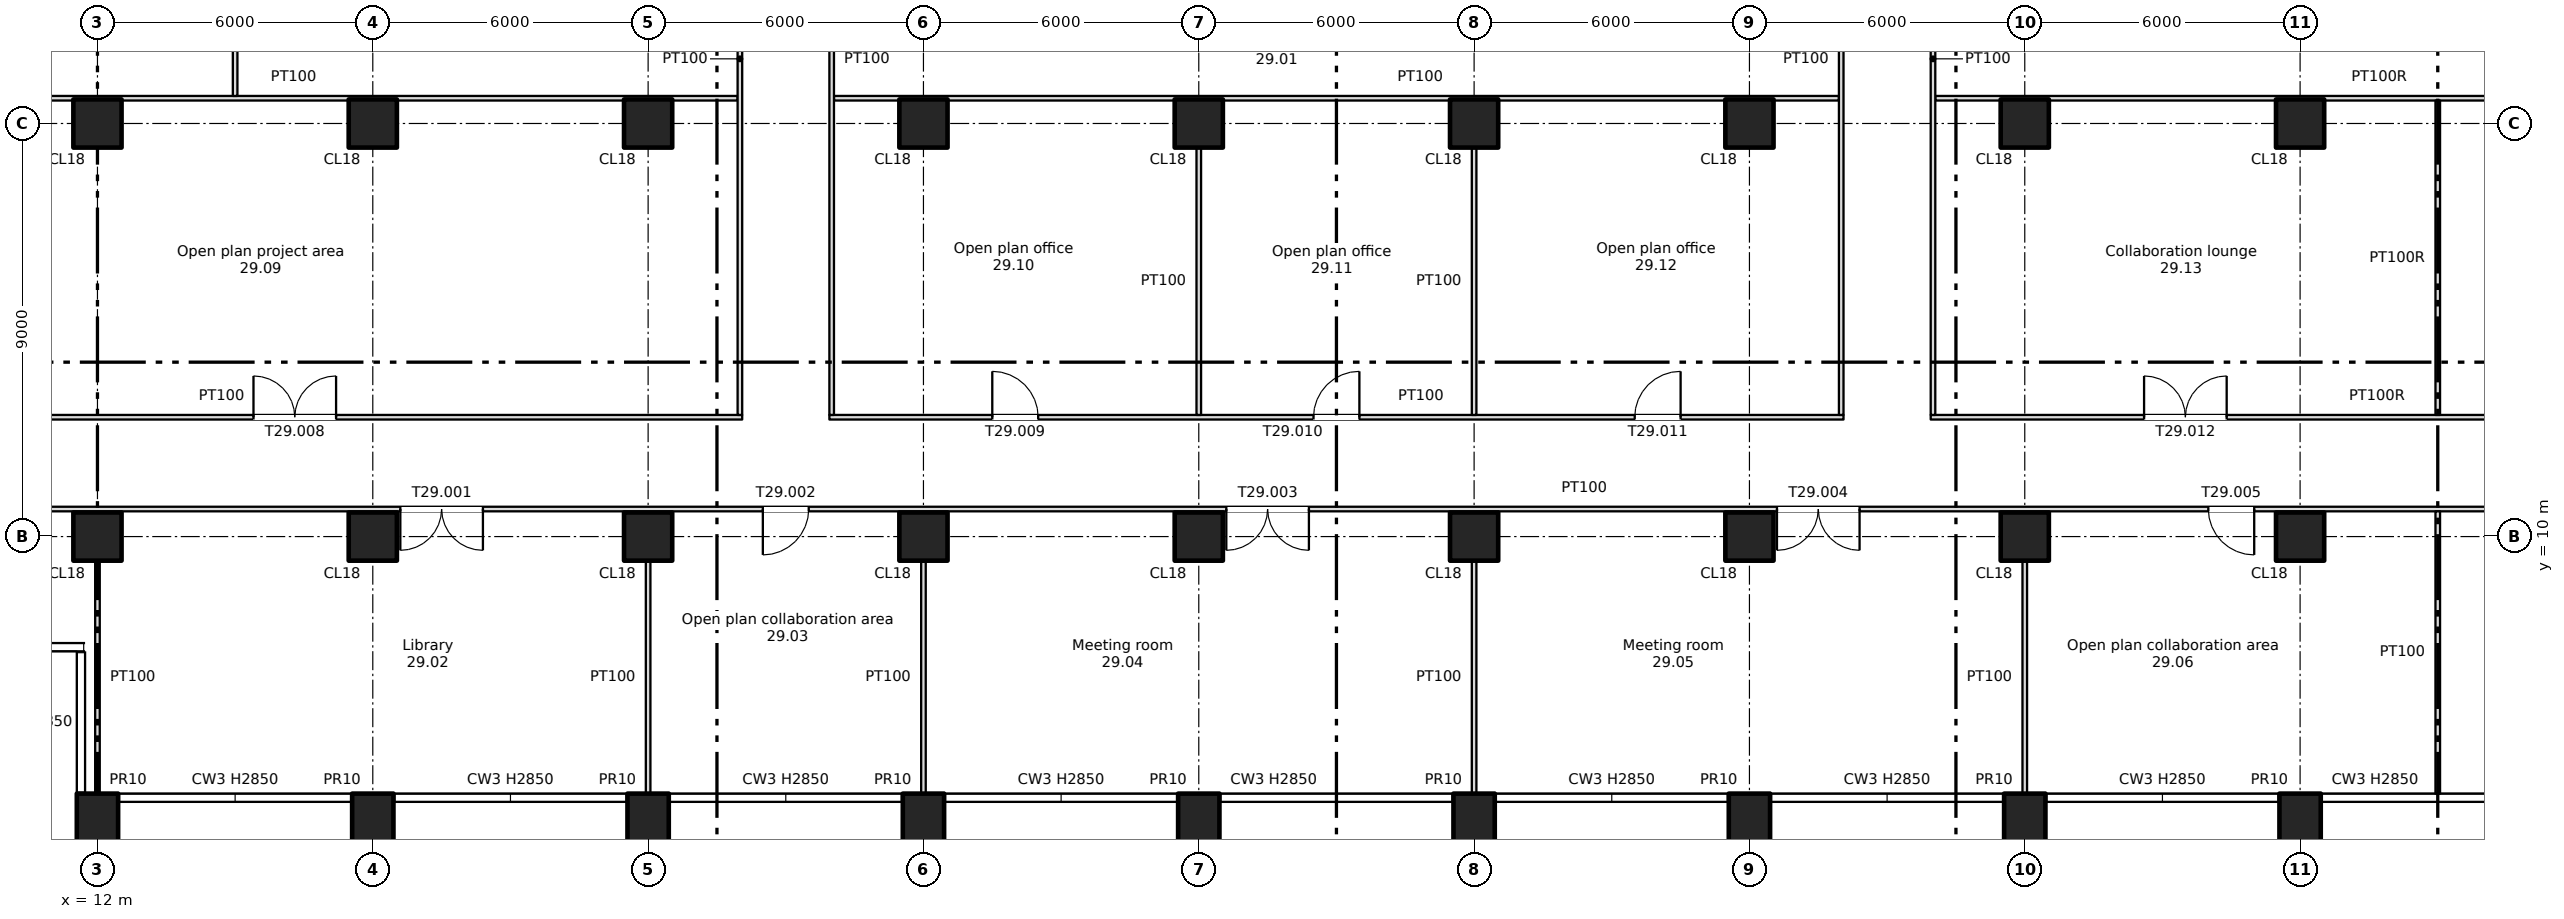
"""IFC4 building model, lengths in metres.
Left out: names, types, materials, properties, quantities, classifications, styles, units other than length and angle.
Written with IfcOpenShell. Run it as: python <this file> out.ifc"""

import sys

from ifc_helpers import new_model, si_unit, direction, frame, frame_2d, origin, origin_2d, place, context, subcontext, project, spatial, rectangle, extrude, element, fill, save


model = new_model("IFC4")
c1 = context("Model", 3, precision=1e-05, world=origin(), true_north=direction((0.0, 1.0)))
c2 = subcontext(c1, "Body", "Model", "MODEL_VIEW")
j1 = project(units=[si_unit("LENGTHUNIT", "METRE"), si_unit("PLANEANGLEUNIT", "RADIAN")], contexts=[c1])
p1 = place(None, origin())
s1 = spatial("IfcSite", under=j1, at=p1, CompositionType="ELEMENT")
p2 = place(p1, origin())
s2 = spatial("IfcBuilding", under=s1, at=p2, CompositionType="ELEMENT")
p3 = place(p2, frame((0.0, 0.0, 204.25)))
s3 = spatial("IfcBuildingStorey", under=s2, at=p3, CompositionType="ELEMENT", Elevation=204.25)
for number, where, z_axis, x_axis in (
    (1, (12.0, 3.7, -0.4), (0.0, 0.0, 1.0), (1.0, 0.0, 0.0)),
    (2, (18.0, 3.7, -0.4), (0.0, 0.0, 1.0), (1.0, 0.0, 0.0)),
    (3, (24.0, 3.7, -0.4), (0.0, 0.0, 1.0), (1.0, 0.0, 0.0)),
    (4, (30.0, 3.7, -0.4), (0.0, 0.0, 1.0), (1.0, 0.0, 0.0)),
    (5, (36.0, 3.7, -0.4), (0.0, 0.0, 1.0), (1.0, 0.0, 0.0)),
    (6, (42.0, 3.7, -0.4), (0.0, 0.0, 1.0), (1.0, 0.0, 0.0)),
    (7, (48.0, 3.7, -0.4), (0.0, 0.0, 1.0), (1.0, 0.0, 0.0)),
    (8, (54.0, 3.7, -0.4), (0.0, 0.0, 1.0), (1.0, 0.0, 0.0)),
    (9, (60.0, 3.7, -0.4), (0.0, 0.0, 1.0), (1.0, 0.0, 0.0)),
):
    element("IfcColumn", number, at=place(p3, frame(where, z_axis=z_axis, x_axis=x_axis)), inside=s3, PredefinedType="COLUMN", context=c2, shape_type="SweptSolid", body=[
        extrude(rectangle(XDim=0.9, YDim=1.4, at=origin_2d()), origin(), (0.0, 0.0, 1.0), 3.75),
    ])
for number, where, z_axis, x_axis in (
    (10, (12.0, 10.0, 0.0), (0.0, 0.0, 1.0), (1.0, 0.0, 0.0)),
    (11, (12.0, 19.0, 0.0), (0.0, 0.0, 1.0), (1.0, 0.0, 0.0)),
    (12, (18.0, 10.0, 0.0), (0.0, 0.0, 1.0), (1.0, 0.0, 0.0)),
    (13, (18.0, 19.0, 0.0), (0.0, 0.0, 1.0), (1.0, 0.0, 0.0)),
    (14, (24.0, 10.0, 0.0), (0.0, 0.0, 1.0), (1.0, 0.0, 0.0)),
    (15, (24.0, 19.0, 0.0), (0.0, 0.0, 1.0), (1.0, 0.0, 0.0)),
    (16, (30.0, 10.0, 0.0), (0.0, 0.0, 1.0), (1.0, 0.0, 0.0)),
    (17, (30.0, 19.0, 0.0), (0.0, 0.0, 1.0), (1.0, 0.0, 0.0)),
    (18, (36.0, 10.0, 0.0), (0.0, 0.0, 1.0), (1.0, 0.0, 0.0)),
    (19, (36.0, 19.0, 0.0), (0.0, 0.0, 1.0), (1.0, 0.0, 0.0)),
    (20, (42.0, 10.0, 0.0), (0.0, 0.0, 1.0), (1.0, 0.0, 0.0)),
    (21, (42.0, 19.0, 0.0), (0.0, 0.0, 1.0), (1.0, 0.0, 0.0)),
    (22, (48.0, 10.0, 0.0), (0.0, 0.0, 1.0), (1.0, 0.0, 0.0)),
    (23, (48.0, 19.0, 0.0), (0.0, 0.0, 1.0), (1.0, 0.0, 0.0)),
    (24, (54.0, 10.0, 0.0), (0.0, 0.0, 1.0), (1.0, 0.0, 0.0)),
    (25, (54.0, 19.0, 0.0), (0.0, 0.0, 1.0), (1.0, 0.0, 0.0)),
    (26, (60.0, 10.0, 0.0), (0.0, 0.0, 1.0), (1.0, 0.0, 0.0)),
    (27, (60.0, 19.0, 0.0), (0.0, 0.0, 1.0), (1.0, 0.0, 0.0)),
):
    element("IfcColumn", number, at=place(p3, frame(where, z_axis=z_axis, x_axis=x_axis)), inside=s3, PredefinedType="COLUMN", context=c2, shape_type="SweptSolid", body=[
        extrude(rectangle(XDim=1.05, YDim=1.05, at=origin_2d()), origin(), (0.0, 0.0, 1.0), 3.35),
    ])
p4 = place(p3, frame((6.6, 10.6, 0.0), z_axis=(0.0, 0.0, 1.0), x_axis=(1.0, 0.0, 0.0)))
e28 = element("IfcWall", 28, at=p4, inside=s3, PredefinedType="PARTITIONING", context=c2, shape_type="SweptSolid", body=[
    extrude(rectangle(XDim=64.8, YDim=0.1, at=frame_2d((32.4, 0.0))), origin(), (0.0, 0.0, 1.0), 3.35),
])
p5 = place(p4, frame((12.0, 0.0, 0.0)))
e29 = element("IfcOpeningElement", 29, at=p5, cuts=e28, PredefinedType="OPENING", context=c2, shape_type="SweptSolid", body=[
    extrude(rectangle(XDim=1.8, YDim=2.1, at=frame_2d((0.9, 1.05))), frame((0.0, 0.06, 0.0), z_axis=(0.0, -1.0, 0.0), x_axis=(1.0, 0.0, 0.0)), (0.0, 0.0, 1.0), 0.12),
])
p6 = place(p4, frame((19.9, 0.0, 0.0)))
e30 = element("IfcOpeningElement", 30, at=p6, cuts=e28, PredefinedType="OPENING", context=c2, shape_type="SweptSolid", body=[
    extrude(rectangle(XDim=1.0, YDim=2.1, at=frame_2d((0.5, 1.05))), frame((0.0, 0.06, 0.0), z_axis=(0.0, -1.0, 0.0), x_axis=(1.0, 0.0, 0.0)), (0.0, 0.0, 1.0), 0.12),
])
p7 = place(p4, frame((30.0, 0.0, 0.0)))
e31 = element("IfcOpeningElement", 31, at=p7, cuts=e28, PredefinedType="OPENING", context=c2, shape_type="SweptSolid", body=[
    extrude(rectangle(XDim=1.8, YDim=2.1, at=frame_2d((0.9, 1.05))), frame((0.0, 0.06, 0.0), z_axis=(0.0, -1.0, 0.0), x_axis=(1.0, 0.0, 0.0)), (0.0, 0.0, 1.0), 0.12),
])
p8 = place(p4, frame((42.0, 0.0, 0.0)))
e32 = element("IfcOpeningElement", 32, at=p8, cuts=e28, PredefinedType="OPENING", context=c2, shape_type="SweptSolid", body=[
    extrude(rectangle(XDim=1.8, YDim=2.1, at=frame_2d((0.9, 1.05))), frame((0.0, 0.06, 0.0), z_axis=(0.0, -1.0, 0.0), x_axis=(1.0, 0.0, 0.0)), (0.0, 0.0, 1.0), 0.12),
])
p9 = place(p4, frame((51.4, 0.0, 0.0)))
e33 = element("IfcOpeningElement", 33, at=p9, cuts=e28, PredefinedType="OPENING", context=c2, shape_type="SweptSolid", body=[
    extrude(rectangle(XDim=1.0, YDim=2.1, at=frame_2d((0.5, 1.05))), frame((0.0, 0.06, 0.0), z_axis=(0.0, -1.0, 0.0), x_axis=(1.0, 0.0, 0.0)), (0.0, 0.0, 1.0), 0.12),
])
p10 = place(p4, frame((60.1, 0.0, 0.0)))
e34 = element("IfcOpeningElement", 34, at=p10, cuts=e28, PredefinedType="OPENING", context=c2, shape_type="SweptSolid", body=[
    extrude(rectangle(XDim=1.0, YDim=2.1, at=frame_2d((0.5, 1.05))), frame((0.0, 0.06, 0.0), z_axis=(0.0, -1.0, 0.0), x_axis=(1.0, 0.0, 0.0)), (0.0, 0.0, 1.0), 0.12),
])
p11 = place(p4, frame((2.2, 0.0, 0.0)))
e35 = element("IfcOpeningElement", 35, at=p11, cuts=e28, PredefinedType="OPENING", context=c2, shape_type="SweptSolid", body=[
    extrude(rectangle(XDim=1.0, YDim=2.1, at=frame_2d((0.5, 1.05))), frame((0.0, 0.06, 0.0), z_axis=(0.0, -1.0, 0.0), x_axis=(1.0, 0.0, 0.0)), (0.0, 0.0, 1.0), 0.12),
])
p12 = place(p3, frame((6.6, 12.6, 0.0), z_axis=(0.0, 0.0, 1.0), x_axis=(1.0, 0.0, 0.0)))
e36 = element("IfcWall", 36, at=p12, inside=s3, PredefinedType="PARTITIONING", context=c2, shape_type="SweptSolid", body=[
    extrude(rectangle(XDim=19.45, YDim=0.1, at=frame_2d((9.725, 0.0))), origin(), (0.0, 0.0, 1.0), 3.35),
])
p13 = place(p12, frame((8.8, 0.0, 0.0)))
e37 = element("IfcOpeningElement", 37, at=p13, cuts=e36, PredefinedType="OPENING", context=c2, shape_type="SweptSolid", body=[
    extrude(rectangle(XDim=1.8, YDim=2.1, at=frame_2d((0.9, 1.05))), frame((0.0, 0.06, 0.0), z_axis=(0.0, -1.0, 0.0), x_axis=(1.0, 0.0, 0.0)), (0.0, 0.0, 1.0), 0.12),
])
p14 = place(p3, frame((27.95, 12.6, 0.0), z_axis=(0.0, 0.0, 1.0), x_axis=(1.0, 0.0, 0.0)))
e38 = element("IfcWall", 38, at=p14, inside=s3, PredefinedType="PARTITIONING", context=c2, shape_type="SweptSolid", body=[
    extrude(rectangle(XDim=22.1, YDim=0.1, at=frame_2d((11.05, 0.0))), origin(), (0.0, 0.0, 1.0), 3.35),
])
p15 = place(p14, frame((3.55, 0.0, 0.0)))
e39 = element("IfcOpeningElement", 39, at=p15, cuts=e38, PredefinedType="OPENING", context=c2, shape_type="SweptSolid", body=[
    extrude(rectangle(XDim=1.0, YDim=2.1, at=frame_2d((0.5, 1.05))), frame((0.0, 0.06, 0.0), z_axis=(0.0, -1.0, 0.0), x_axis=(1.0, 0.0, 0.0)), (0.0, 0.0, 1.0), 0.12),
])
p16 = place(p14, frame((10.55, 0.0, 0.0)))
e40 = element("IfcOpeningElement", 40, at=p16, cuts=e38, PredefinedType="OPENING", context=c2, shape_type="SweptSolid", body=[
    extrude(rectangle(XDim=1.0, YDim=2.1, at=frame_2d((0.5, 1.05))), frame((0.0, 0.06, 0.0), z_axis=(0.0, -1.0, 0.0), x_axis=(1.0, 0.0, 0.0)), (0.0, 0.0, 1.0), 0.12),
])
p17 = place(p14, frame((17.55, 0.0, 0.0)))
e41 = element("IfcOpeningElement", 41, at=p17, cuts=e38, PredefinedType="OPENING", context=c2, shape_type="SweptSolid", body=[
    extrude(rectangle(XDim=1.0, YDim=2.1, at=frame_2d((0.5, 1.05))), frame((0.0, 0.06, 0.0), z_axis=(0.0, -1.0, 0.0), x_axis=(1.0, 0.0, 0.0)), (0.0, 0.0, 1.0), 0.12),
])
p18 = place(p3, frame((51.95, 12.6, 0.0), z_axis=(0.0, 0.0, 1.0), x_axis=(1.0, 0.0, 0.0)))
e42 = element("IfcWall", 42, at=p18, inside=s3, PredefinedType="PARTITIONING", context=c2, shape_type="SweptSolid", body=[
    extrude(rectangle(XDim=19.45, YDim=0.1, at=frame_2d((9.725, 0.0))), origin(), (0.0, 0.0, 1.0), 3.35),
])
p19 = place(p18, frame((4.65, 0.0, 0.0)))
e43 = element("IfcOpeningElement", 43, at=p19, cuts=e42, PredefinedType="OPENING", context=c2, shape_type="SweptSolid", body=[
    extrude(rectangle(XDim=1.8, YDim=2.1, at=frame_2d((0.9, 1.05))), frame((0.0, 0.06, 0.0), z_axis=(0.0, -1.0, 0.0), x_axis=(1.0, 0.0, 0.0)), (0.0, 0.0, 1.0), 0.12),
])
p20 = place(p18, frame((14.75, 0.0, 0.0)))
e44 = element("IfcOpeningElement", 44, at=p20, cuts=e42, PredefinedType="OPENING", context=c2, shape_type="SweptSolid", body=[
    extrude(rectangle(XDim=1.0, YDim=2.1, at=frame_2d((0.5, 1.05))), frame((0.0, 0.06, 0.0), z_axis=(0.0, -1.0, 0.0), x_axis=(1.0, 0.0, 0.0)), (0.0, 0.0, 1.0), 0.12),
])
p21 = place(p3, frame((6.6, 19.55, 0.0), z_axis=(0.0, 0.0, 1.0), x_axis=(1.0, 0.0, 0.0)))
e45 = element("IfcWall", 45, at=p21, inside=s3, PredefinedType="PARTITIONING", context=c2, shape_type="SweptSolid", body=[
    extrude(rectangle(XDim=19.35, YDim=0.1, at=frame_2d((9.675, 0.0))), origin(), (0.0, 0.0, 1.0), 3.35),
])
p22 = place(p3, frame((28.05, 19.55, 0.0), z_axis=(0.0, 0.0, 1.0), x_axis=(1.0, 0.0, 0.0)))
e46 = element("IfcWall", 46, at=p22, inside=s3, PredefinedType="PARTITIONING", context=c2, shape_type="SweptSolid", body=[
    extrude(rectangle(XDim=21.9, YDim=0.1, at=frame_2d((10.95, 0.0))), origin(), (0.0, 0.0, 1.0), 3.35),
])
p23 = place(p3, frame((52.05, 19.55, 0.0), z_axis=(0.0, 0.0, 1.0), x_axis=(1.0, 0.0, 0.0)))
e47 = element("IfcWall", 47, at=p23, inside=s3, PredefinedType="PARTITIONING", context=c2, shape_type="SweptSolid", body=[
    extrude(rectangle(XDim=19.35, YDim=0.1, at=frame_2d((9.675, 0.0))), origin(), (0.0, 0.0, 1.0), 3.35),
])
p24 = place(p3, frame((12.0, 4.4, 0.0), z_axis=(0.0, 0.0, 1.0), x_axis=(0.0, 1.0, 0.0)))
e48 = element("IfcWall", 48, at=p24, inside=s3, PredefinedType="PARTITIONING", context=c2, shape_type="SweptSolid", body=[
    extrude(rectangle(XDim=5.075, YDim=0.1, at=frame_2d((2.538, 0.0))), origin(), (0.0, 0.0, 1.0), 3.35),
])
p25 = place(p3, frame((15.0, 19.6, 0.0), z_axis=(0.0, 0.0, 1.0), x_axis=(0.0, 1.0, 0.0)))
e49 = element("IfcWall", 49, at=p25, inside=s3, PredefinedType="PARTITIONING", context=c2, shape_type="SweptSolid", body=[
    extrude(rectangle(XDim=6.35, YDim=0.1, at=frame_2d((3.175, 0.0))), origin(), (0.0, 0.0, 1.0), 3.35),
])
p26 = place(p3, frame((24.0, 4.4, 0.0), z_axis=(0.0, 0.0, 1.0), x_axis=(0.0, 1.0, 0.0)))
e50 = element("IfcWall", 50, at=p26, inside=s3, PredefinedType="PARTITIONING", context=c2, shape_type="SweptSolid", body=[
    extrude(rectangle(XDim=5.075, YDim=0.1, at=frame_2d((2.538, 0.0))), origin(), (0.0, 0.0, 1.0), 3.35),
])
for number, where, z_axis, x_axis in (
    (51, (26.0, 12.65, 0.0), (0.0, 0.0, 1.0), (0.0, 1.0, 0.0)),
    (52, (28.0, 12.65, 0.0), (0.0, 0.0, 1.0), (0.0, 1.0, 0.0)),
):
    element("IfcWall", number, at=place(p3, frame(where, z_axis=z_axis, x_axis=x_axis)), inside=s3, PredefinedType="PARTITIONING", context=c2, shape_type="SweptSolid", body=[
        extrude(rectangle(XDim=13.3, YDim=0.1, at=frame_2d((6.65, 0.0))), origin(), (0.0, 0.0, 1.0), 3.35),
    ])
p27 = place(p3, frame((30.0, 4.4, 0.0), z_axis=(0.0, 0.0, 1.0), x_axis=(0.0, 1.0, 0.0)))
e53 = element("IfcWall", 53, at=p27, inside=s3, PredefinedType="PARTITIONING", context=c2, shape_type="SweptSolid", body=[
    extrude(rectangle(XDim=5.075, YDim=0.1, at=frame_2d((2.538, 0.0))), origin(), (0.0, 0.0, 1.0), 3.35),
])
p28 = place(p3, frame((36.0, 12.65, 0.0), z_axis=(0.0, 0.0, 1.0), x_axis=(0.0, 1.0, 0.0)))
e54 = element("IfcWall", 54, at=p28, inside=s3, PredefinedType="PARTITIONING", context=c2, shape_type="SweptSolid", body=[
    extrude(rectangle(XDim=5.825, YDim=0.1, at=frame_2d((2.913, 0.0))), origin(), (0.0, 0.0, 1.0), 3.35),
])
p29 = place(p3, frame((42.0, 4.4, 0.0), z_axis=(0.0, 0.0, 1.0), x_axis=(0.0, 1.0, 0.0)))
e55 = element("IfcWall", 55, at=p29, inside=s3, PredefinedType="PARTITIONING", context=c2, shape_type="SweptSolid", body=[
    extrude(rectangle(XDim=5.075, YDim=0.1, at=frame_2d((2.538, 0.0))), origin(), (0.0, 0.0, 1.0), 3.35),
])
p30 = place(p3, frame((42.0, 12.65, 0.0), z_axis=(0.0, 0.0, 1.0), x_axis=(0.0, 1.0, 0.0)))
e56 = element("IfcWall", 56, at=p30, inside=s3, PredefinedType="PARTITIONING", context=c2, shape_type="SweptSolid", body=[
    extrude(rectangle(XDim=5.825, YDim=0.1, at=frame_2d((2.913, 0.0))), origin(), (0.0, 0.0, 1.0), 3.35),
])
for number, where, z_axis, x_axis in (
    (57, (50.0, 12.65, 0.0), (0.0, 0.0, 1.0), (0.0, 1.0, 0.0)),
    (58, (52.0, 12.65, 0.0), (0.0, 0.0, 1.0), (0.0, 1.0, 0.0)),
):
    element("IfcWall", number, at=place(p3, frame(where, z_axis=z_axis, x_axis=x_axis)), inside=s3, PredefinedType="PARTITIONING", context=c2, shape_type="SweptSolid", body=[
        extrude(rectangle(XDim=13.3, YDim=0.1, at=frame_2d((6.65, 0.0))), origin(), (0.0, 0.0, 1.0), 3.35),
    ])
p31 = place(p3, frame((54.0, 4.4, 0.0), z_axis=(0.0, 0.0, 1.0), x_axis=(0.0, 1.0, 0.0)))
e59 = element("IfcWall", 59, at=p31, inside=s3, PredefinedType="PARTITIONING", context=c2, shape_type="SweptSolid", body=[
    extrude(rectangle(XDim=5.075, YDim=0.1, at=frame_2d((2.538, 0.0))), origin(), (0.0, 0.0, 1.0), 3.35),
])
p32 = place(p3, frame((63.0, 4.4, 0.0), z_axis=(0.0, 0.0, 1.0), x_axis=(0.0, 1.0, 0.0)))
e60 = element("IfcWall", 60, at=p32, inside=s3, PredefinedType="PARTITIONING", context=c2, shape_type="SweptSolid", body=[
    extrude(rectangle(XDim=6.15, YDim=0.1, at=frame_2d((3.075, 0.0))), origin(), (0.0, 0.0, 1.0), 3.35),
])
p33 = place(p3, frame((63.0, 12.65, 0.0), z_axis=(0.0, 0.0, 1.0), x_axis=(0.0, 1.0, 0.0)))
e61 = element("IfcWall", 61, at=p33, inside=s3, PredefinedType="PARTITIONING", context=c2, shape_type="SweptSolid", body=[
    extrude(rectangle(XDim=6.85, YDim=0.1, at=frame_2d((3.425, 0.0))), origin(), (0.0, 0.0, 1.0), 3.35),
])
p34 = place(p5, origin())
e62 = element("IfcDoor", 62, at=p34, inside=s3, OperationType="DOUBLE_DOOR_SINGLE_SWING", PredefinedType="DOOR", context=c2, shape_type="SweptSolid", body=[
    extrude(rectangle(XDim=1.8, YDim=2.1, at=frame_2d((0.9, 1.05))), frame((0.0, 0.025, 0.0), z_axis=(0.0, -1.0, 0.0), x_axis=(1.0, 0.0, 0.0)), (0.0, 0.0, 1.0), 0.05),
])
fill(e29, e62)
p35 = place(p6, origin())
e63 = element("IfcDoor", 63, at=p35, inside=s3, OperationType="SINGLE_SWING_LEFT", PredefinedType="DOOR", context=c2, shape_type="SweptSolid", body=[
    extrude(rectangle(XDim=1.0, YDim=2.1, at=frame_2d((0.5, 1.05))), frame((0.0, 0.025, 0.0), z_axis=(0.0, -1.0, 0.0), x_axis=(1.0, 0.0, 0.0)), (0.0, 0.0, 1.0), 0.05),
])
fill(e30, e63)
p36 = place(p7, origin())
e64 = element("IfcDoor", 64, at=p36, inside=s3, OperationType="DOUBLE_DOOR_SINGLE_SWING", PredefinedType="DOOR", context=c2, shape_type="SweptSolid", body=[
    extrude(rectangle(XDim=1.8, YDim=2.1, at=frame_2d((0.9, 1.05))), frame((0.0, 0.025, 0.0), z_axis=(0.0, -1.0, 0.0), x_axis=(1.0, 0.0, 0.0)), (0.0, 0.0, 1.0), 0.05),
])
fill(e31, e64)
p37 = place(p8, origin())
e65 = element("IfcDoor", 65, at=p37, inside=s3, OperationType="DOUBLE_DOOR_SINGLE_SWING", PredefinedType="DOOR", context=c2, shape_type="SweptSolid", body=[
    extrude(rectangle(XDim=1.8, YDim=2.1, at=frame_2d((0.9, 1.05))), frame((0.0, 0.025, 0.0), z_axis=(0.0, -1.0, 0.0), x_axis=(1.0, 0.0, 0.0)), (0.0, 0.0, 1.0), 0.05),
])
fill(e32, e65)
p38 = place(p9, origin())
e66 = element("IfcDoor", 66, at=p38, inside=s3, OperationType="SINGLE_SWING_RIGHT", PredefinedType="DOOR", context=c2, shape_type="SweptSolid", body=[
    extrude(rectangle(XDim=1.0, YDim=2.1, at=frame_2d((0.5, 1.05))), frame((0.0, 0.025, 0.0), z_axis=(0.0, -1.0, 0.0), x_axis=(1.0, 0.0, 0.0)), (0.0, 0.0, 1.0), 0.05),
])
fill(e33, e66)
p39 = place(p13, origin())
e67 = element("IfcDoor", 67, at=p39, inside=s3, OperationType="DOUBLE_DOOR_SINGLE_SWING", PredefinedType="DOOR", context=c2, shape_type="SweptSolid", body=[
    extrude(rectangle(XDim=1.8, YDim=2.1, at=frame_2d((0.9, 1.05))), frame((0.0, 0.025, 0.0), z_axis=(0.0, -1.0, 0.0), x_axis=(1.0, 0.0, 0.0)), (0.0, 0.0, 1.0), 0.05),
])
fill(e37, e67)
p40 = place(p15, origin())
e68 = element("IfcDoor", 68, at=p40, inside=s3, OperationType="SINGLE_SWING_LEFT", PredefinedType="DOOR", context=c2, shape_type="SweptSolid", body=[
    extrude(rectangle(XDim=1.0, YDim=2.1, at=frame_2d((0.5, 1.05))), frame((0.0, 0.025, 0.0), z_axis=(0.0, -1.0, 0.0), x_axis=(1.0, 0.0, 0.0)), (0.0, 0.0, 1.0), 0.05),
])
fill(e39, e68)
p41 = place(p16, origin())
e69 = element("IfcDoor", 69, at=p41, inside=s3, OperationType="SINGLE_SWING_RIGHT", PredefinedType="DOOR", context=c2, shape_type="SweptSolid", body=[
    extrude(rectangle(XDim=1.0, YDim=2.1, at=frame_2d((0.5, 1.05))), frame((0.0, 0.025, 0.0), z_axis=(0.0, -1.0, 0.0), x_axis=(1.0, 0.0, 0.0)), (0.0, 0.0, 1.0), 0.05),
])
fill(e40, e69)
p42 = place(p17, origin())
e70 = element("IfcDoor", 70, at=p42, inside=s3, OperationType="SINGLE_SWING_RIGHT", PredefinedType="DOOR", context=c2, shape_type="SweptSolid", body=[
    extrude(rectangle(XDim=1.0, YDim=2.1, at=frame_2d((0.5, 1.05))), frame((0.0, 0.025, 0.0), z_axis=(0.0, -1.0, 0.0), x_axis=(1.0, 0.0, 0.0)), (0.0, 0.0, 1.0), 0.05),
])
fill(e41, e70)
p43 = place(p19, origin())
e71 = element("IfcDoor", 71, at=p43, inside=s3, OperationType="DOUBLE_DOOR_SINGLE_SWING", PredefinedType="DOOR", context=c2, shape_type="SweptSolid", body=[
    extrude(rectangle(XDim=1.8, YDim=2.1, at=frame_2d((0.9, 1.05))), frame((0.0, 0.025, 0.0), z_axis=(0.0, -1.0, 0.0), x_axis=(1.0, 0.0, 0.0)), (0.0, 0.0, 1.0), 0.05),
])
fill(e43, e71)
save(model, sys.argv[1])
